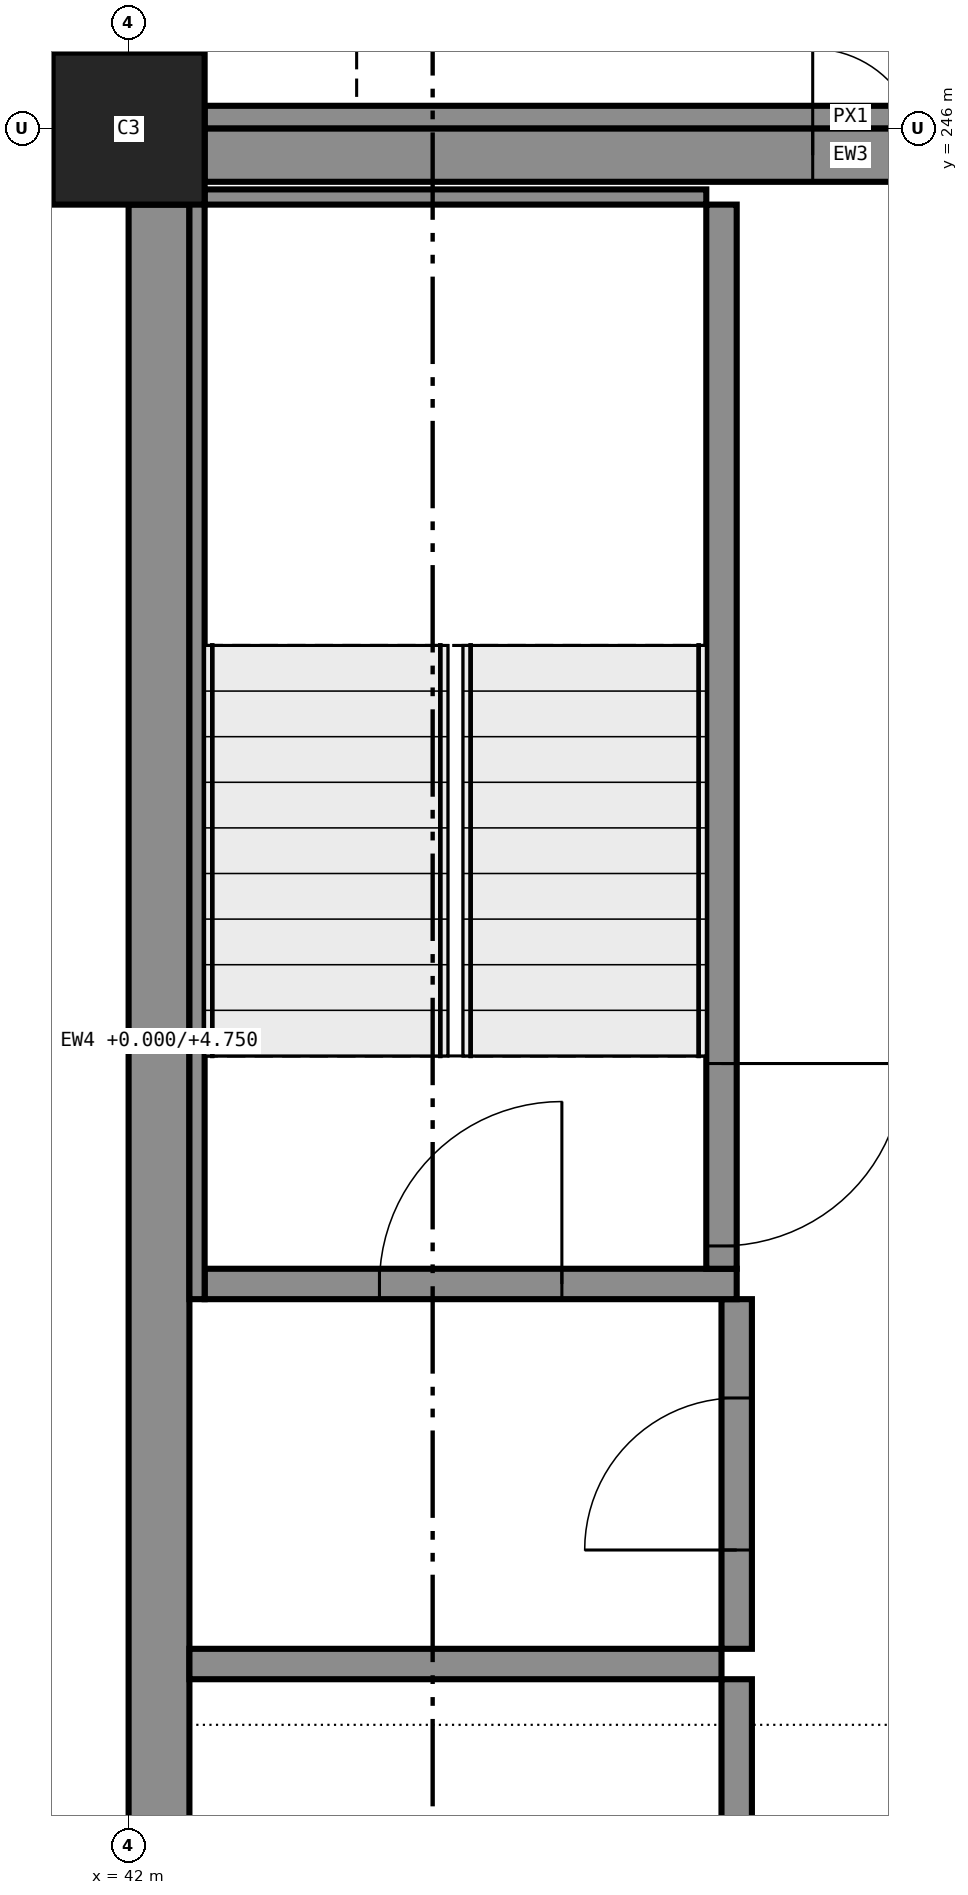
"""IFC4 building model, lengths in metres.
Left out: names, types, materials, properties, quantities, classifications, styles, units other than length and angle.
Written with IfcOpenShell. Run it as: python <this file> out.ifc"""

import sys

from ifc_helpers import new_model, si_unit, direction, frame, frame_2d, origin, origin_2d, place, context, subcontext, project, spatial, polyline, rectangle, outline, extrude, element, fill, save


model = new_model("IFC4")
c1 = context("Model", 3, precision=1e-05, world=origin(), true_north=direction((0.0, 1.0)))
c2 = subcontext(c1, "Body", "Model", "MODEL_VIEW")
j1 = project(units=[si_unit("LENGTHUNIT", "METRE"), si_unit("PLANEANGLEUNIT", "RADIAN")], contexts=[c1])
p1 = place(None, origin())
s1 = spatial("IfcSite", under=j1, at=p1, CompositionType="ELEMENT")
p2 = place(p1, origin())
s2 = spatial("IfcBuilding", under=s1, at=p2, CompositionType="ELEMENT")
p3 = place(p2, origin())
s3 = spatial("IfcBuildingStorey", under=s2, at=p3, CompositionType="ELEMENT", Elevation=0.0)
p4 = place(p3, frame((42.0, 246.0, 0.0), z_axis=(0.0, 0.0, 1.0), x_axis=(1.0, 0.0, 0.0)))
e1 = element("IfcColumn", 1, at=p4, inside=s3, PredefinedType="COLUMN", context=c2, shape_type="SweptSolid", body=[
    extrude(rectangle(XDim=1.0, YDim=1.0, at=origin_2d()), origin(), (0.0, 0.0, 1.0), 6.0),
])
p5 = place(p3, frame((42.5, 238.4, 0.0), z_axis=(0.0, 0.0, 1.0), x_axis=(1.0, 0.0, 0.0)))
e2 = element("IfcWall", 2, at=p5, inside=s3, PredefinedType="SHEAR", context=c2, shape_type="SweptSolid", body=[
    extrude(rectangle(XDim=3.5, YDim=0.2, at=frame_2d((1.75, 0.0))), origin(), (0.0, 0.0, 1.0), 6.0),
])
p6 = place(p5, frame((1.15, 0.0, 0.0)))
e3 = element("IfcOpeningElement", 3, at=p6, cuts=e2, PredefinedType="OPENING", context=c2, shape_type="SweptSolid", body=[
    extrude(rectangle(XDim=1.2, YDim=2.1, at=frame_2d((0.6, 1.05))), frame((0.0, 0.11, 0.0), z_axis=(0.0, -1.0, 0.0), x_axis=(1.0, 0.0, 0.0)), (0.0, 0.0, 1.0), 0.22),
])
p7 = place(p3, frame((45.9, 238.5, 0.0), z_axis=(0.0, 0.0, 1.0), x_axis=(0.0, 1.0, 0.0)))
e4 = element("IfcWall", 4, at=p7, inside=s3, PredefinedType="SHEAR", context=c2, shape_type="SweptSolid", body=[
    extrude(rectangle(XDim=7.0, YDim=0.2, at=frame_2d((3.5, 0.0))), origin(), (0.0, 0.0, 1.0), 6.0),
])
p8 = place(p7, frame((0.15, 0.0, 0.0)))
e5 = element("IfcOpeningElement", 5, at=p8, cuts=e4, PredefinedType="OPENING", context=c2, shape_type="SweptSolid", body=[
    extrude(rectangle(XDim=1.2, YDim=2.1, at=frame_2d((0.6, 1.05))), frame((0.0, 0.11, 0.0), z_axis=(0.0, -1.0, 0.0), x_axis=(1.0, 0.0, 0.0)), (0.0, 0.0, 1.0), 0.22),
])
p9 = place(p3, frame((42.45, 238.3, 0.0), z_axis=(0.0, 0.0, 1.0), x_axis=(0.0, 1.0, 0.0)))
e6 = element("IfcWall", 6, at=p9, inside=s3, PredefinedType="SHEAR", context=c2, shape_type="SweptSolid", body=[
    extrude(rectangle(XDim=7.3, YDim=0.1, at=frame_2d((3.65, 0.0))), origin(), (0.0, 0.0, 1.0), 5.75),
])
p10 = place(p3, frame((42.5, 245.55, 0.0), z_axis=(0.0, 0.0, 1.0), x_axis=(1.0, 0.0, 0.0)))
e7 = element("IfcWall", 7, at=p10, inside=s3, PredefinedType="SHEAR", context=c2, shape_type="SweptSolid", body=[
    extrude(rectangle(XDim=3.3, YDim=0.1, at=frame_2d((1.65, 0.0))), origin(), (0.0, 0.0, 1.0), 5.75),
])
p11 = place(p3, frame((53.5, 245.825, 0.0), z_axis=(0.0, 0.0, 1.0), x_axis=(-1.0, 0.0, 0.0)))
e8 = element("IfcWall", 8, at=p11, inside=s3, PredefinedType="STANDARD", context=c2, shape_type="SweptSolid", body=[
    extrude(rectangle(XDim=11.0, YDim=0.35, at=frame_2d((5.5, 0.0))), origin(), (0.0, 0.0, 1.0), 4.75),
])
p12 = place(p11, frame((5.6, 0.0, 0.0)))
e9 = element("IfcOpeningElement", 9, at=p12, cuts=e8, PredefinedType="OPENING", context=c2, shape_type="SweptSolid", body=[
    extrude(rectangle(XDim=1.4, YDim=2.4, at=frame_2d((0.7, 1.2))), frame((0.0, 0.185, 0.0), z_axis=(0.0, -1.0, 0.0), x_axis=(1.0, 0.0, 0.0)), (0.0, 0.0, 1.0), 0.37),
])
p13 = place(p3, frame((53.5, 246.075, 5.75), z_axis=(0.0, 0.0, 1.0), x_axis=(-1.0, 0.0, 0.0)))
e10 = element("IfcWall", 10, at=p13, inside=s3, PredefinedType="STANDARD", context=c2, shape_type="SweptSolid", body=[
    extrude(rectangle(XDim=11.0, YDim=0.15, at=frame_2d((5.5, 0.0))), origin(), (0.0, 0.0, 1.0), 0.25),
])
p14 = place(p3, frame((42.2, 245.5, 0.0), z_axis=(0.0, 0.0, 1.0), x_axis=(0.0, -1.0, 0.0)))
e11 = element("IfcWall", 11, at=p14, inside=s3, PredefinedType="SOLIDWALL", context=c2, shape_type="SweptSolid", body=[
    extrude(rectangle(XDim=11.0, YDim=0.4, at=frame_2d((5.5, 0.0))), origin(), (0.0, 0.0, 1.0), 4.75),
])
p15 = place(p3, frame((6.0, 246.7, 0.0), z_axis=(0.0, 0.0, 1.0), x_axis=(1.0, 0.0, 0.0)))
e12 = element("IfcWall", 12, at=p15, inside=s3, PredefinedType="SHEAR", context=c2, shape_type="SweptSolid", body=[
    extrude(outline(polyline([(0.0, 0.0), (6.0, 0.0), (6.0, 12.0), (6.5, 13.399), (7.0, 14.437), (7.5, 15.282), (8.0, 16.0), (8.5, 16.624), (9.0, 17.175), (9.5, 17.665), (10.0, 18.105), (10.5, 18.5), (11.0, 18.856), (11.5, 19.177), (12.0, 19.466), (12.5, 19.725), (13.0, 19.956), (13.5, 20.162), (14.0, 20.343), (14.5, 20.5), (15.0, 20.635), (15.5, 20.747), (16.0, 20.839), (16.5, 20.91), (17.0, 20.96), (17.5, 20.99), (18.0, 21.0), (18.5, 20.99), (19.0, 20.96), (19.5, 20.91), (20.0, 20.839), (20.5, 20.747), (21.0, 20.635), (21.5, 20.5), (22.0, 20.343), (22.5, 20.162), (23.0, 19.956), (23.5, 19.725), (24.0, 19.466), (24.5, 19.177), (25.0, 18.856), (25.5, 18.5), (26.0, 18.105), (26.5, 17.665), (27.0, 17.175), (27.5, 16.624), (28.0, 16.0), (28.5, 15.282), (29.0, 14.437), (29.5, 13.399), (30.0, 12.0), (30.0, 0.0), (36.0, 0.0), (36.0, 21.0), (21.0, 24.0), (21.0, 22.5), (15.0, 22.5), (15.0, 24.0), (0.0, 21.0), (0.0, 0.0)])), frame((0.0, 0.5, 0.0), z_axis=(0.0, -1.0, 0.0), x_axis=(1.0, 0.0, 0.0)), (0.0, 0.0, 1.0), 1.0),
])
p16 = place(p3, frame((42.4, 235.9, 0.0), z_axis=(0.0, 0.0, 1.0), x_axis=(1.0, 0.0, 0.0)))
e13 = element("IfcWall", 13, at=p16, inside=s3, PredefinedType="PARTITIONING", context=c2, shape_type="SweptSolid", body=[
    extrude(rectangle(XDim=3.5, YDim=0.2, at=frame_2d((1.75, 0.0))), origin(), (0.0, 0.0, 1.0), 5.75),
])
p17 = place(p3, frame((46.0, 232.2, 0.0), z_axis=(0.0, 0.0, 1.0), x_axis=(0.0, 1.0, 0.0)))
e14 = element("IfcWall", 14, at=p17, inside=s3, PredefinedType="PARTITIONING", context=c2, shape_type="SweptSolid", body=[
    extrude(rectangle(XDim=3.6, YDim=0.2, at=frame_2d((1.8, 0.0))), origin(), (0.0, 0.0, 1.0), 5.75),
])
p18 = place(p17, frame((1.35, 0.0, 0.0)))
e15 = element("IfcOpeningElement", 15, at=p18, cuts=e14, PredefinedType="OPENING", context=c2, shape_type="SweptSolid", body=[
    extrude(rectangle(XDim=0.9, YDim=2.1, at=frame_2d((0.45, 1.05))), frame((0.0, 0.11, 0.0), z_axis=(0.0, -1.0, 0.0), x_axis=(1.0, 0.0, 0.0)), (0.0, 0.0, 1.0), 0.22),
])
p19 = place(p3, frame((46.0, 236.0, 0.0), z_axis=(0.0, 0.0, 1.0), x_axis=(0.0, 1.0, 0.0)))
e16 = element("IfcWall", 16, at=p19, inside=s3, PredefinedType="PARTITIONING", context=c2, shape_type="SweptSolid", body=[
    extrude(rectangle(XDim=2.3, YDim=0.2, at=frame_2d((1.15, 0.0))), origin(), (0.0, 0.0, 1.0), 5.75),
])
p20 = place(p19, frame((0.65, 0.0, 0.0)))
e17 = element("IfcOpeningElement", 17, at=p20, cuts=e16, PredefinedType="OPENING", context=c2, shape_type="SweptSolid", body=[
    extrude(rectangle(XDim=1.0, YDim=2.1, at=frame_2d((0.5, 1.05))), frame((0.0, 0.11, 0.0), z_axis=(0.0, -1.0, 0.0), x_axis=(1.0, 0.0, 0.0)), (0.0, 0.0, 1.0), 0.22),
])
p21 = place(p12, frame((1.4, 0.0, 0.0), z_axis=(0.0, 0.0, 1.0), x_axis=(-1.0, 0.0, 0.0)))
e18 = element("IfcDoor", 18, at=p21, inside=s3, OperationType="DOUBLE_DOOR_SINGLE_SWING", PredefinedType="DOOR", context=c2, shape_type="SweptSolid", body=[
    extrude(rectangle(XDim=1.4, YDim=2.4, at=frame_2d((0.7, 1.2))), frame((0.0, 0.025, 0.0), z_axis=(0.0, -1.0, 0.0), x_axis=(1.0, 0.0, 0.0)), (0.0, 0.0, 1.0), 0.05),
])
fill(e9, e18)
p22 = place(p20, origin())
e19 = element("IfcDoor", 19, at=p22, inside=s3, OperationType="SINGLE_SWING_LEFT", PredefinedType="DOOR", context=c2, shape_type="SweptSolid", body=[
    extrude(rectangle(XDim=1.0, YDim=2.1, at=frame_2d((0.5, 1.05))), frame((0.0, 0.025, 0.0), z_axis=(0.0, -1.0, 0.0), x_axis=(1.0, 0.0, 0.0)), (0.0, 0.0, 1.0), 0.05),
])
fill(e17, e19)
p23 = place(p6, origin())
e20 = element("IfcDoor", 20, at=p23, inside=s3, OperationType="SINGLE_SWING_RIGHT", PredefinedType="DOOR", context=c2, shape_type="SweptSolid", body=[
    extrude(rectangle(XDim=1.2, YDim=2.1, at=frame_2d((0.6, 1.05))), frame((0.0, 0.025, 0.0), z_axis=(0.0, -1.0, 0.0), x_axis=(1.0, 0.0, 0.0)), (0.0, 0.0, 1.0), 0.05),
])
fill(e3, e20)
p24 = place(p8, frame((1.2, 0.0, 0.0), z_axis=(0.0, 0.0, 1.0), x_axis=(-1.0, 0.0, 0.0)))
e21 = element("IfcDoor", 21, at=p24, inside=s3, OperationType="SINGLE_SWING_RIGHT", PredefinedType="DOOR", context=c2, shape_type="SweptSolid", body=[
    extrude(rectangle(XDim=1.2, YDim=2.1, at=frame_2d((0.6, 1.05))), frame((0.0, 0.025, 0.0), z_axis=(0.0, -1.0, 0.0), x_axis=(1.0, 0.0, 0.0)), (0.0, 0.0, 1.0), 0.05),
])
fill(e5, e21)
save(model, sys.argv[1])
